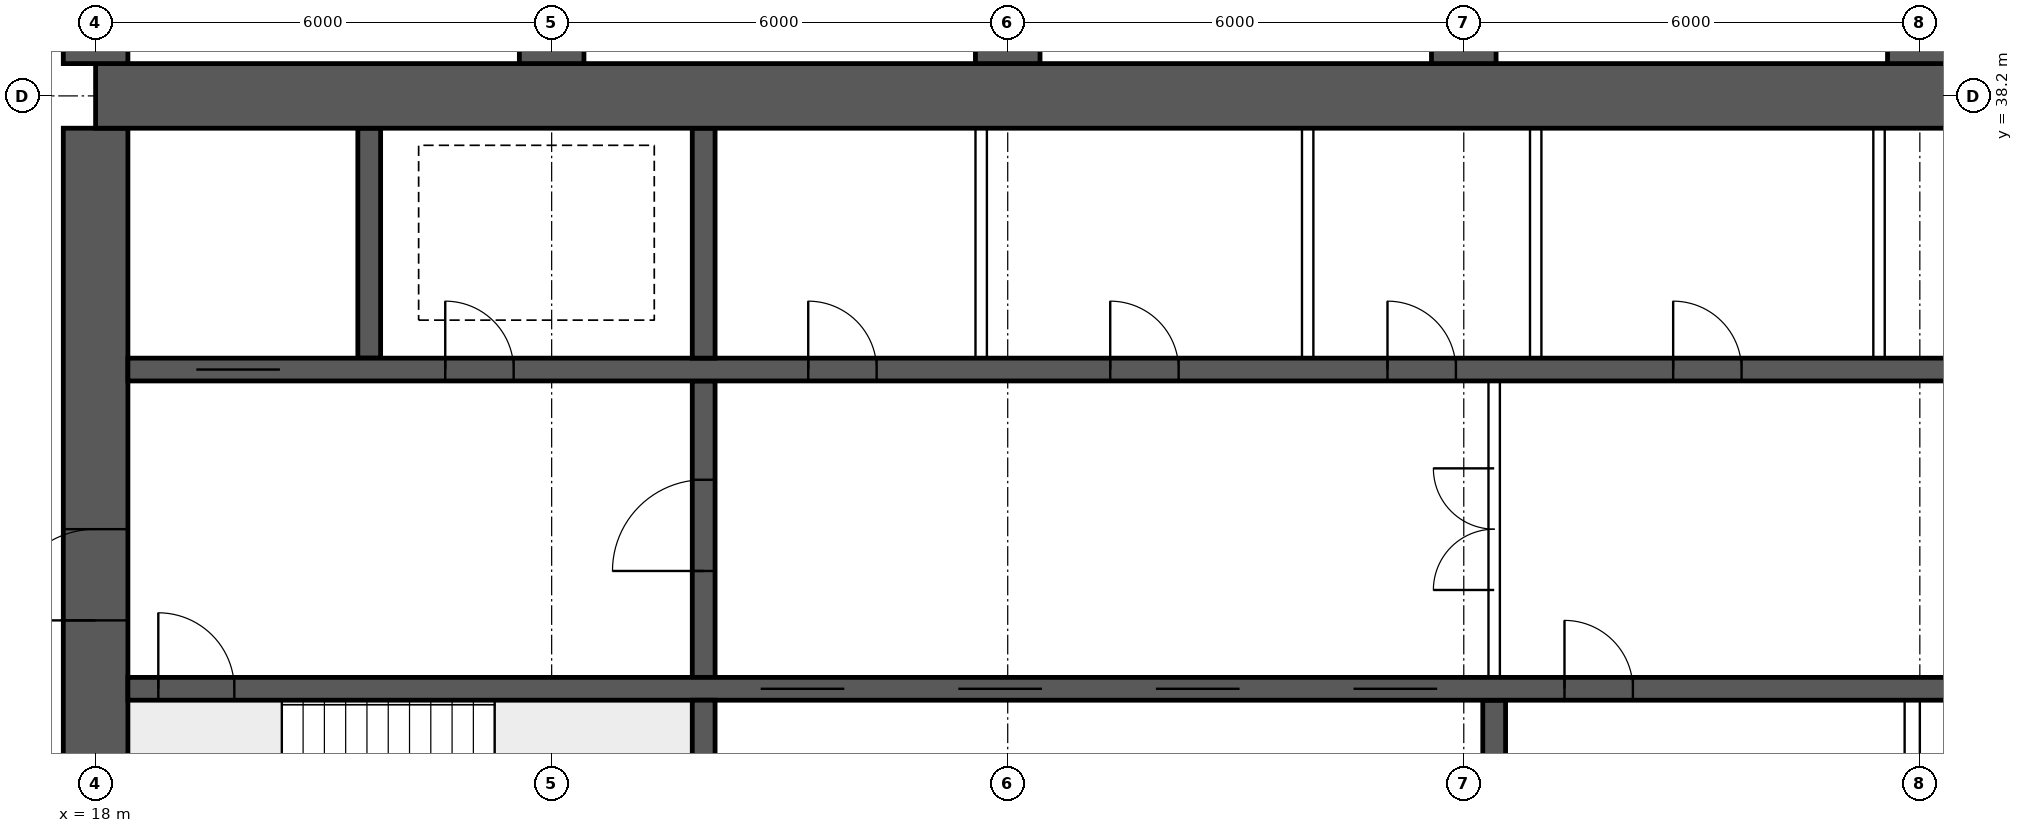
"""IFC4 building model, lengths in metres.
Left out: names, types, materials, properties, quantities, classifications, styles, units other than length and angle.
Written with IfcOpenShell. Run it as: python <this file> out.ifc"""

import sys

from ifc_helpers import new_model, si_unit, direction, frame, frame_2d, origin, place, context, subcontext, project, spatial, rectangle, extrude, element, fill, save


model = new_model("IFC4")
c1 = context("Model", 3, precision=1e-05, world=origin(), true_north=direction((0.0, 1.0)))
c2 = subcontext(c1, "Body", "Model", "MODEL_VIEW")
j1 = project(units=[si_unit("LENGTHUNIT", "METRE"), si_unit("PLANEANGLEUNIT", "RADIAN")], contexts=[c1])
p1 = place(None, origin())
s1 = spatial("IfcSite", under=j1, at=p1, CompositionType="ELEMENT")
p2 = place(p1, origin())
s2 = spatial("IfcBuilding", under=s1, at=p2, CompositionType="ELEMENT")
p3 = place(p2, frame((0.0, 0.0, 189.85)))
s3 = spatial("IfcBuildingStorey", under=s2, at=p3, CompositionType="ELEMENT", Elevation=189.85)
p4 = place(p3, frame((18.0, 38.2, 0.0), z_axis=(0.0, 0.0, 1.0), x_axis=(1.0, 0.0, 0.0)))
e1 = element("IfcWall", 1, at=p4, inside=s3, PredefinedType="SHEAR", context=c2, shape_type="SweptSolid", body=[
    extrude(rectangle(XDim=48.0, YDim=0.85, at=frame_2d((24.0, 0.0))), origin(), (0.0, 0.0, 1.0), 3.75),
])
p5 = place(p3, frame((18.0, 26.225, 0.0), z_axis=(0.0, 0.0, 1.0), x_axis=(0.0, 1.0, 0.0)))
e2 = element("IfcWall", 2, at=p5, inside=s3, PredefinedType="SHEAR", context=c2, shape_type="SweptSolid", body=[
    extrude(rectangle(XDim=11.55, YDim=0.85, at=frame_2d((5.775, 0.0))), origin(), (0.0, 0.0, 1.0), 3.75),
])
p6 = place(p5, frame((5.075, 0.0, 0.0)))
e3 = element("IfcOpeningElement", 3, at=p6, cuts=e2, PredefinedType="OPENING", context=c2, shape_type="SweptSolid", body=[
    extrude(rectangle(XDim=1.2, YDim=2.1, at=frame_2d((0.6, 1.05))), frame((0.0, 0.435, 0.0), z_axis=(0.0, -1.0, 0.0), x_axis=(1.0, 0.0, 0.0)), (0.0, 0.0, 1.0), 0.87),
])
p7 = place(p3, frame((18.425, 30.4, 0.0), z_axis=(0.0, 0.0, 1.0), x_axis=(1.0, 0.0, 0.0)))
e4 = element("IfcWall", 4, at=p7, inside=s3, PredefinedType="SHEAR", context=c2, shape_type="SweptSolid", body=[
    extrude(rectangle(XDim=47.15, YDim=0.3, at=frame_2d((23.575, 0.0))), origin(), (0.0, 0.0, 1.0), 3.75),
])
p8 = place(p7, frame((0.4, 0.0, 0.0)))
e5 = element("IfcOpeningElement", 5, at=p8, cuts=e4, PredefinedType="OPENING", context=c2, shape_type="SweptSolid", body=[
    extrude(rectangle(XDim=1.0, YDim=2.1, at=frame_2d((0.5, 1.05))), frame((0.0, 0.16, 0.0), z_axis=(0.0, -1.0, 0.0), x_axis=(1.0, 0.0, 0.0)), (0.0, 0.0, 1.0), 0.32),
])
p9 = place(p7, frame((45.75, 0.0, 0.0)))
e6 = element("IfcOpeningElement", 6, at=p9, cuts=e4, PredefinedType="OPENING", context=c2, shape_type="SweptSolid", body=[
    extrude(rectangle(XDim=1.0, YDim=2.1, at=frame_2d((0.5, 1.05))), frame((0.0, 0.16, 0.0), z_axis=(0.0, -1.0, 0.0), x_axis=(1.0, 0.0, 0.0)), (0.0, 0.0, 1.0), 0.32),
])
p10 = place(p7, frame((8.325, 0.0, 0.0)))
e7 = element("IfcOpeningElement", 7, at=p10, cuts=e4, PredefinedType="OPENING", context=c2, shape_type="SweptSolid", body=[
    extrude(rectangle(XDim=1.1, YDim=2.1, at=frame_2d((0.55, 1.05))), frame((0.0, 0.16, 0.0), z_axis=(0.0, -1.0, 0.0), x_axis=(1.0, 0.0, 0.0)), (0.0, 0.0, 1.0), 0.32),
])
p11 = place(p7, frame((10.925, 0.0, 0.0)))
e8 = element("IfcOpeningElement", 8, at=p11, cuts=e4, PredefinedType="OPENING", context=c2, shape_type="SweptSolid", body=[
    extrude(rectangle(XDim=1.1, YDim=2.1, at=frame_2d((0.55, 1.05))), frame((0.0, 0.16, 0.0), z_axis=(0.0, -1.0, 0.0), x_axis=(1.0, 0.0, 0.0)), (0.0, 0.0, 1.0), 0.32),
])
p12 = place(p7, frame((13.525, 0.0, 0.0)))
e9 = element("IfcOpeningElement", 9, at=p12, cuts=e4, PredefinedType="OPENING", context=c2, shape_type="SweptSolid", body=[
    extrude(rectangle(XDim=1.1, YDim=2.1, at=frame_2d((0.55, 1.05))), frame((0.0, 0.16, 0.0), z_axis=(0.0, -1.0, 0.0), x_axis=(1.0, 0.0, 0.0)), (0.0, 0.0, 1.0), 0.32),
])
p13 = place(p7, frame((16.125, 0.0, 0.0)))
e10 = element("IfcOpeningElement", 10, at=p13, cuts=e4, PredefinedType="OPENING", context=c2, shape_type="SweptSolid", body=[
    extrude(rectangle(XDim=1.1, YDim=2.1, at=frame_2d((0.55, 1.05))), frame((0.0, 0.16, 0.0), z_axis=(0.0, -1.0, 0.0), x_axis=(1.0, 0.0, 0.0)), (0.0, 0.0, 1.0), 0.32),
])
p14 = place(p7, frame((18.9, 0.0, 0.0)))
e11 = element("IfcOpeningElement", 11, at=p14, cuts=e4, PredefinedType="OPENING", context=c2, shape_type="SweptSolid", body=[
    extrude(rectangle(XDim=0.9, YDim=2.1, at=frame_2d((0.45, 1.05))), frame((0.0, 0.16, 0.0), z_axis=(0.0, -1.0, 0.0), x_axis=(1.0, 0.0, 0.0)), (0.0, 0.0, 1.0), 0.32),
])
p15 = place(p7, frame((30.192, 0.0, 0.0)))
e12 = element("IfcOpeningElement", 12, at=p15, cuts=e4, PredefinedType="OPENING", context=c2, shape_type="SweptSolid", body=[
    extrude(rectangle(XDim=1.1, YDim=2.1, at=frame_2d((0.55, 1.05))), frame((0.0, 0.16, 0.0), z_axis=(0.0, -1.0, 0.0), x_axis=(1.0, 0.0, 0.0)), (0.0, 0.0, 1.0), 0.32),
])
p16 = place(p7, frame((33.725, 0.0, 0.0)))
e13 = element("IfcOpeningElement", 13, at=p16, cuts=e4, PredefinedType="OPENING", context=c2, shape_type="SweptSolid", body=[
    extrude(rectangle(XDim=1.1, YDim=2.1, at=frame_2d((0.55, 1.05))), frame((0.0, 0.16, 0.0), z_axis=(0.0, -1.0, 0.0), x_axis=(1.0, 0.0, 0.0)), (0.0, 0.0, 1.0), 0.32),
])
p17 = place(p7, frame((37.258, 0.0, 0.0)))
e14 = element("IfcOpeningElement", 14, at=p17, cuts=e4, PredefinedType="OPENING", context=c2, shape_type="SweptSolid", body=[
    extrude(rectangle(XDim=1.1, YDim=2.1, at=frame_2d((0.55, 1.05))), frame((0.0, 0.16, 0.0), z_axis=(0.0, -1.0, 0.0), x_axis=(1.0, 0.0, 0.0)), (0.0, 0.0, 1.0), 0.32),
])
p18 = place(p3, frame((18.425, 34.6, 0.0), z_axis=(0.0, 0.0, 1.0), x_axis=(1.0, 0.0, 0.0)))
e15 = element("IfcWall", 15, at=p18, inside=s3, PredefinedType="SHEAR", context=c2, shape_type="SweptSolid", body=[
    extrude(rectangle(XDim=47.15, YDim=0.3, at=frame_2d((23.575, 0.0))), origin(), (0.0, 0.0, 1.0), 3.75),
])
p19 = place(p18, frame((0.9, 0.0, 0.0)))
e16 = element("IfcOpeningElement", 16, at=p19, cuts=e15, PredefinedType="OPENING", context=c2, shape_type="SweptSolid", body=[
    extrude(rectangle(XDim=1.1, YDim=2.1, at=frame_2d((0.55, 1.05))), frame((0.0, 0.16, 0.0), z_axis=(0.0, -1.0, 0.0), x_axis=(1.0, 0.0, 0.0)), (0.0, 0.0, 1.0), 0.32),
])
p20 = place(p18, frame((45.15, 0.0, 0.0)))
e17 = element("IfcOpeningElement", 17, at=p20, cuts=e15, PredefinedType="OPENING", context=c2, shape_type="SweptSolid", body=[
    extrude(rectangle(XDim=1.1, YDim=2.1, at=frame_2d((0.55, 1.05))), frame((0.0, 0.16, 0.0), z_axis=(0.0, -1.0, 0.0), x_axis=(1.0, 0.0, 0.0)), (0.0, 0.0, 1.0), 0.32),
])
p21 = place(p18, frame((4.175, 0.0, 0.0)))
e18 = element("IfcOpeningElement", 18, at=p21, cuts=e15, PredefinedType="OPENING", context=c2, shape_type="SweptSolid", body=[
    extrude(rectangle(XDim=0.9, YDim=2.1, at=frame_2d((0.45, 1.05))), frame((0.0, 0.16, 0.0), z_axis=(0.0, -1.0, 0.0), x_axis=(1.0, 0.0, 0.0)), (0.0, 0.0, 1.0), 0.32),
])
p22 = place(p18, frame((42.075, 0.0, 0.0)))
e19 = element("IfcOpeningElement", 19, at=p22, cuts=e15, PredefinedType="OPENING", context=c2, shape_type="SweptSolid", body=[
    extrude(rectangle(XDim=0.9, YDim=2.1, at=frame_2d((0.45, 1.05))), frame((0.0, 0.16, 0.0), z_axis=(0.0, -1.0, 0.0), x_axis=(1.0, 0.0, 0.0)), (0.0, 0.0, 1.0), 0.32),
])
p23 = place(p18, frame((8.95, 0.0, 0.0)))
e20 = element("IfcOpeningElement", 20, at=p23, cuts=e15, PredefinedType="OPENING", context=c2, shape_type="SweptSolid", body=[
    extrude(rectangle(XDim=0.9, YDim=2.1, at=frame_2d((0.45, 1.05))), frame((0.0, 0.16, 0.0), z_axis=(0.0, -1.0, 0.0), x_axis=(1.0, 0.0, 0.0)), (0.0, 0.0, 1.0), 0.32),
])
p24 = place(p18, frame((12.924, 0.0, 0.0)))
e21 = element("IfcOpeningElement", 21, at=p24, cuts=e15, PredefinedType="OPENING", context=c2, shape_type="SweptSolid", body=[
    extrude(rectangle(XDim=0.9, YDim=2.1, at=frame_2d((0.45, 1.05))), frame((0.0, 0.16, 0.0), z_axis=(0.0, -1.0, 0.0), x_axis=(1.0, 0.0, 0.0)), (0.0, 0.0, 1.0), 0.32),
])
p25 = place(p18, frame((16.571, 0.0, 0.0)))
e22 = element("IfcOpeningElement", 22, at=p25, cuts=e15, PredefinedType="OPENING", context=c2, shape_type="SweptSolid", body=[
    extrude(rectangle(XDim=0.9, YDim=2.1, at=frame_2d((0.45, 1.05))), frame((0.0, 0.16, 0.0), z_axis=(0.0, -1.0, 0.0), x_axis=(1.0, 0.0, 0.0)), (0.0, 0.0, 1.0), 0.32),
])
p26 = place(p18, frame((20.33, 0.0, 0.0)))
e23 = element("IfcOpeningElement", 23, at=p26, cuts=e15, PredefinedType="OPENING", context=c2, shape_type="SweptSolid", body=[
    extrude(rectangle(XDim=0.9, YDim=2.1, at=frame_2d((0.45, 1.05))), frame((0.0, 0.16, 0.0), z_axis=(0.0, -1.0, 0.0), x_axis=(1.0, 0.0, 0.0)), (0.0, 0.0, 1.0), 0.32),
])
p27 = place(p18, frame((24.736, 0.0, 0.0)))
e24 = element("IfcOpeningElement", 24, at=p27, cuts=e15, PredefinedType="OPENING", context=c2, shape_type="SweptSolid", body=[
    extrude(rectangle(XDim=0.9, YDim=2.1, at=frame_2d((0.45, 1.05))), frame((0.0, 0.16, 0.0), z_axis=(0.0, -1.0, 0.0), x_axis=(1.0, 0.0, 0.0)), (0.0, 0.0, 1.0), 0.32),
])
p28 = place(p18, frame((27.533, 0.0, 0.0)))
e25 = element("IfcOpeningElement", 25, at=p28, cuts=e15, PredefinedType="OPENING", context=c2, shape_type="SweptSolid", body=[
    extrude(rectangle(XDim=0.9, YDim=2.1, at=frame_2d((0.45, 1.05))), frame((0.0, 0.16, 0.0), z_axis=(0.0, -1.0, 0.0), x_axis=(1.0, 0.0, 0.0)), (0.0, 0.0, 1.0), 0.32),
])
p29 = place(p18, frame((30.716, 0.0, 0.0)))
e26 = element("IfcOpeningElement", 26, at=p29, cuts=e15, PredefinedType="OPENING", context=c2, shape_type="SweptSolid", body=[
    extrude(rectangle(XDim=0.9, YDim=2.1, at=frame_2d((0.45, 1.05))), frame((0.0, 0.16, 0.0), z_axis=(0.0, -1.0, 0.0), x_axis=(1.0, 0.0, 0.0)), (0.0, 0.0, 1.0), 0.32),
])
p30 = place(p18, frame((34.667, 0.0, 0.0)))
e27 = element("IfcOpeningElement", 27, at=p30, cuts=e15, PredefinedType="OPENING", context=c2, shape_type="SweptSolid", body=[
    extrude(rectangle(XDim=0.9, YDim=2.1, at=frame_2d((0.45, 1.05))), frame((0.0, 0.16, 0.0), z_axis=(0.0, -1.0, 0.0), x_axis=(1.0, 0.0, 0.0)), (0.0, 0.0, 1.0), 0.32),
])
p31 = place(p18, frame((37.605, 0.0, 0.0)))
e28 = element("IfcOpeningElement", 28, at=p31, cuts=e15, PredefinedType="OPENING", context=c2, shape_type="SweptSolid", body=[
    extrude(rectangle(XDim=0.9, YDim=2.1, at=frame_2d((0.45, 1.05))), frame((0.0, 0.16, 0.0), z_axis=(0.0, -1.0, 0.0), x_axis=(1.0, 0.0, 0.0)), (0.0, 0.0, 1.0), 0.32),
])
p32 = place(p3, frame((26.0, 26.225, 0.0), z_axis=(0.0, 0.0, 1.0), x_axis=(0.0, 1.0, 0.0)))
e29 = element("IfcWall", 29, at=p32, inside=s3, PredefinedType="SHEAR", context=c2, shape_type="SweptSolid", body=[
    extrude(rectangle(XDim=4.025, YDim=0.3, at=frame_2d((2.012, 0.0))), origin(), (0.0, 0.0, 1.0), 3.75),
])
p33 = place(p3, frame((26.0, 30.55, 0.0), z_axis=(0.0, 0.0, 1.0), x_axis=(0.0, 1.0, 0.0)))
e30 = element("IfcWall", 30, at=p33, inside=s3, PredefinedType="SHEAR", context=c2, shape_type="SweptSolid", body=[
    extrude(rectangle(XDim=3.9, YDim=0.3, at=frame_2d((1.95, 0.0))), origin(), (0.0, 0.0, 1.0), 3.75),
])
p34 = place(p33, frame((1.4, 0.0, 0.0)))
e31 = element("IfcOpeningElement", 31, at=p34, cuts=e30, PredefinedType="OPENING", context=c2, shape_type="SweptSolid", body=[
    extrude(rectangle(XDim=1.2, YDim=2.1, at=frame_2d((0.6, 1.05))), frame((0.0, 0.16, 0.0), z_axis=(0.0, -1.0, 0.0), x_axis=(1.0, 0.0, 0.0)), (0.0, 0.0, 1.0), 0.32),
])
for number, where, z_axis, x_axis in (
    (32, (21.6, 34.75, 0.0), (0.0, 0.0, 1.0), (0.0, 1.0, 0.0)),
    (33, (26.0, 34.75, 0.0), (0.0, 0.0, 1.0), (0.0, 1.0, 0.0)),
):
    element("IfcWall", number, at=place(p3, frame(where, z_axis=z_axis, x_axis=x_axis)), inside=s3, PredefinedType="SHEAR", context=c2, shape_type="SweptSolid", body=[
        extrude(rectangle(XDim=3.025, YDim=0.3, at=frame_2d((1.512, 0.0))), origin(), (0.0, 0.0, 1.0), 3.75),
    ])
p35 = place(p3, frame((36.4, 26.225, 0.0), z_axis=(0.0, 0.0, 1.0), x_axis=(0.0, 1.0, 0.0)))
e34 = element("IfcWall", 34, at=p35, inside=s3, PredefinedType="SHEAR", context=c2, shape_type="SweptSolid", body=[
    extrude(rectangle(XDim=4.025, YDim=0.3, at=frame_2d((2.012, 0.0))), origin(), (0.0, 0.0, 1.0), 3.75),
])
for number, where, z_axis, x_axis in (
    (35, (18.0, 38.625, 0.0), (0.0, 0.0, 1.0), (0.0, 1.0, 0.0)),
    (36, (24.0, 38.625, 0.0), (0.0, 0.0, 1.0), (0.0, 1.0, 0.0)),
    (37, (30.0, 38.625, 0.0), (0.0, 0.0, 1.0), (0.0, 1.0, 0.0)),
    (38, (36.0, 38.625, 0.0), (0.0, 0.0, 1.0), (0.0, 1.0, 0.0)),
    (39, (42.0, 38.625, 0.0), (0.0, 0.0, 1.0), (0.0, 1.0, 0.0)),
):
    element("IfcWall", number, at=place(p3, frame(where, z_axis=z_axis, x_axis=x_axis)), inside=s3, PredefinedType="SHEAR", context=c2, shape_type="SweptSolid", body=[
        extrude(rectangle(XDim=8.175, YDim=0.85, at=frame_2d((4.087, 0.0))), origin(), (0.0, 0.0, 1.0), 3.75),
    ])
p36 = place(p3, frame((36.4, 30.55, 0.0), z_axis=(0.0, 0.0, 1.0), x_axis=(0.0, 1.0, 0.0)))
e40 = element("IfcWall", 40, at=p36, inside=s3, PredefinedType="SOLIDWALL", context=c2, shape_type="SweptSolid", body=[
    extrude(rectangle(XDim=3.9, YDim=0.15, at=frame_2d((1.95, 0.0))), origin(), (0.0, 0.0, 1.0), 3.3),
])
p37 = place(p36, frame((1.15, 0.0, 0.0)))
e41 = element("IfcOpeningElement", 41, at=p37, cuts=e40, PredefinedType="OPENING", context=c2, shape_type="SweptSolid", body=[
    extrude(rectangle(XDim=1.6, YDim=2.1, at=frame_2d((0.8, 1.05))), frame((0.0, 0.085, 0.0), z_axis=(0.0, -1.0, 0.0), x_axis=(1.0, 0.0, 0.0)), (0.0, 0.0, 1.0), 0.17),
])
for number, where, z_axis, x_axis in (
    (42, (29.651, 34.75, 0.0), (0.0, 0.0, 1.0), (0.0, 1.0, 0.0)),
    (43, (33.946, 34.75, 0.0), (0.0, 0.0, 1.0), (0.0, 1.0, 0.0)),
    (44, (36.946, 34.75, 0.0), (0.0, 0.0, 1.0), (0.0, 1.0, 0.0)),
    (45, (41.463, 34.75, 0.0), (0.0, 0.0, 1.0), (0.0, 1.0, 0.0)),
):
    element("IfcWall", number, at=place(p3, frame(where, z_axis=z_axis, x_axis=x_axis)), inside=s3, PredefinedType="SOLIDWALL", context=c2, shape_type="SweptSolid", body=[
        extrude(rectangle(XDim=3.025, YDim=0.15, at=frame_2d((1.512, 0.0))), origin(), (0.0, 0.0, 1.0), 3.3),
    ])
p38 = place(p3, frame((41.9, 26.225, 0.0), z_axis=(0.0, 0.0, 1.0), x_axis=(0.0, 1.0, 0.0)))
e46 = element("IfcWall", 46, at=p38, inside=s3, PredefinedType="SOLIDWALL", context=c2, shape_type="SweptSolid", body=[
    extrude(rectangle(XDim=4.025, YDim=0.2, at=frame_2d((2.012, 0.0))), origin(), (0.0, 0.0, 1.0), 3.3),
])
p39 = place(p37, origin())
e47 = element("IfcDoor", 47, at=p39, inside=s3, OperationType="DOUBLE_DOOR_SINGLE_SWING", PredefinedType="DOOR", context=c2, shape_type="SweptSolid", body=[
    extrude(rectangle(XDim=1.6, YDim=2.1, at=frame_2d((0.8, 1.05))), frame((0.0, 0.025, 0.0), z_axis=(0.0, -1.0, 0.0), x_axis=(1.0, 0.0, 0.0)), (0.0, 0.0, 1.0), 0.05),
])
fill(e41, e47)
p40 = place(p6, origin())
e48 = element("IfcDoor", 48, at=p40, inside=s3, OperationType="SINGLE_SWING_LEFT", PredefinedType="DOOR", context=c2, shape_type="SweptSolid", body=[
    extrude(rectangle(XDim=1.2, YDim=2.1, at=frame_2d((0.6, 1.05))), frame((0.0, 0.025, 0.0), z_axis=(0.0, -1.0, 0.0), x_axis=(1.0, 0.0, 0.0)), (0.0, 0.0, 1.0), 0.05),
])
fill(e3, e48)
p41 = place(p8, origin())
e49 = element("IfcDoor", 49, at=p41, inside=s3, OperationType="SINGLE_SWING_LEFT", PredefinedType="DOOR", context=c2, shape_type="SweptSolid", body=[
    extrude(rectangle(XDim=1.0, YDim=2.1, at=frame_2d((0.5, 1.05))), frame((0.0, 0.025, 0.0), z_axis=(0.0, -1.0, 0.0), x_axis=(1.0, 0.0, 0.0)), (0.0, 0.0, 1.0), 0.05),
])
fill(e5, e49)
p42 = place(p19, origin())
e50 = element("IfcDoor", 50, at=p42, inside=s3, OperationType="DOUBLE_DOOR_SLIDING", PredefinedType="DOOR", context=c2, shape_type="SweptSolid", body=[
    extrude(rectangle(XDim=1.1, YDim=2.1, at=frame_2d((0.55, 1.05))), frame((0.0, 0.025, 0.0), z_axis=(0.0, -1.0, 0.0), x_axis=(1.0, 0.0, 0.0)), (0.0, 0.0, 1.0), 0.05),
])
fill(e16, e50)
p43 = place(p21, origin())
e51 = element("IfcDoor", 51, at=p43, inside=s3, OperationType="SINGLE_SWING_LEFT", PredefinedType="DOOR", context=c2, shape_type="SweptSolid", body=[
    extrude(rectangle(XDim=0.9, YDim=2.1, at=frame_2d((0.45, 1.05))), frame((0.0, 0.025, 0.0), z_axis=(0.0, -1.0, 0.0), x_axis=(1.0, 0.0, 0.0)), (0.0, 0.0, 1.0), 0.05),
])
fill(e18, e51)
p44 = place(p34, origin())
e52 = element("IfcDoor", 52, at=p44, inside=s3, OperationType="SINGLE_SWING_LEFT", PredefinedType="DOOR", context=c2, shape_type="SweptSolid", body=[
    extrude(rectangle(XDim=1.2, YDim=2.1, at=frame_2d((0.6, 1.05))), frame((0.0, 0.025, 0.0), z_axis=(0.0, -1.0, 0.0), x_axis=(1.0, 0.0, 0.0)), (0.0, 0.0, 1.0), 0.05),
])
fill(e31, e52)
p45 = place(p23, origin())
e53 = element("IfcDoor", 53, at=p45, inside=s3, OperationType="SINGLE_SWING_LEFT", PredefinedType="DOOR", context=c2, shape_type="SweptSolid", body=[
    extrude(rectangle(XDim=0.9, YDim=2.1, at=frame_2d((0.45, 1.05))), frame((0.0, 0.025, 0.0), z_axis=(0.0, -1.0, 0.0), x_axis=(1.0, 0.0, 0.0)), (0.0, 0.0, 1.0), 0.05),
])
fill(e20, e53)
p46 = place(p24, origin())
e54 = element("IfcDoor", 54, at=p46, inside=s3, OperationType="SINGLE_SWING_LEFT", PredefinedType="DOOR", context=c2, shape_type="SweptSolid", body=[
    extrude(rectangle(XDim=0.9, YDim=2.1, at=frame_2d((0.45, 1.05))), frame((0.0, 0.025, 0.0), z_axis=(0.0, -1.0, 0.0), x_axis=(1.0, 0.0, 0.0)), (0.0, 0.0, 1.0), 0.05),
])
fill(e21, e54)
p47 = place(p25, origin())
e55 = element("IfcDoor", 55, at=p47, inside=s3, OperationType="SINGLE_SWING_LEFT", PredefinedType="DOOR", context=c2, shape_type="SweptSolid", body=[
    extrude(rectangle(XDim=0.9, YDim=2.1, at=frame_2d((0.45, 1.05))), frame((0.0, 0.025, 0.0), z_axis=(0.0, -1.0, 0.0), x_axis=(1.0, 0.0, 0.0)), (0.0, 0.0, 1.0), 0.05),
])
fill(e22, e55)
p48 = place(p26, origin())
e56 = element("IfcDoor", 56, at=p48, inside=s3, OperationType="SINGLE_SWING_LEFT", PredefinedType="DOOR", context=c2, shape_type="SweptSolid", body=[
    extrude(rectangle(XDim=0.9, YDim=2.1, at=frame_2d((0.45, 1.05))), frame((0.0, 0.025, 0.0), z_axis=(0.0, -1.0, 0.0), x_axis=(1.0, 0.0, 0.0)), (0.0, 0.0, 1.0), 0.05),
])
fill(e23, e56)
p49 = place(p10, origin())
e57 = element("IfcDoor", 57, at=p49, inside=s3, OperationType="DOUBLE_DOOR_SLIDING", PredefinedType="DOOR", context=c2, shape_type="SweptSolid", body=[
    extrude(rectangle(XDim=1.1, YDim=2.1, at=frame_2d((0.55, 1.05))), frame((0.0, 0.025, 0.0), z_axis=(0.0, -1.0, 0.0), x_axis=(1.0, 0.0, 0.0)), (0.0, 0.0, 1.0), 0.05),
])
fill(e7, e57)
p50 = place(p11, origin())
e58 = element("IfcDoor", 58, at=p50, inside=s3, OperationType="DOUBLE_DOOR_SLIDING", PredefinedType="DOOR", context=c2, shape_type="SweptSolid", body=[
    extrude(rectangle(XDim=1.1, YDim=2.1, at=frame_2d((0.55, 1.05))), frame((0.0, 0.025, 0.0), z_axis=(0.0, -1.0, 0.0), x_axis=(1.0, 0.0, 0.0)), (0.0, 0.0, 1.0), 0.05),
])
fill(e8, e58)
p51 = place(p12, origin())
e59 = element("IfcDoor", 59, at=p51, inside=s3, OperationType="DOUBLE_DOOR_SLIDING", PredefinedType="DOOR", context=c2, shape_type="SweptSolid", body=[
    extrude(rectangle(XDim=1.1, YDim=2.1, at=frame_2d((0.55, 1.05))), frame((0.0, 0.025, 0.0), z_axis=(0.0, -1.0, 0.0), x_axis=(1.0, 0.0, 0.0)), (0.0, 0.0, 1.0), 0.05),
])
fill(e9, e59)
p52 = place(p13, origin())
e60 = element("IfcDoor", 60, at=p52, inside=s3, OperationType="DOUBLE_DOOR_SLIDING", PredefinedType="DOOR", context=c2, shape_type="SweptSolid", body=[
    extrude(rectangle(XDim=1.1, YDim=2.1, at=frame_2d((0.55, 1.05))), frame((0.0, 0.025, 0.0), z_axis=(0.0, -1.0, 0.0), x_axis=(1.0, 0.0, 0.0)), (0.0, 0.0, 1.0), 0.05),
])
fill(e10, e60)
p53 = place(p14, origin())
e61 = element("IfcDoor", 61, at=p53, inside=s3, OperationType="SINGLE_SWING_LEFT", PredefinedType="DOOR", context=c2, shape_type="SweptSolid", body=[
    extrude(rectangle(XDim=0.9, YDim=2.1, at=frame_2d((0.45, 1.05))), frame((0.0, 0.025, 0.0), z_axis=(0.0, -1.0, 0.0), x_axis=(1.0, 0.0, 0.0)), (0.0, 0.0, 1.0), 0.05),
])
fill(e11, e61)
save(model, sys.argv[1])
